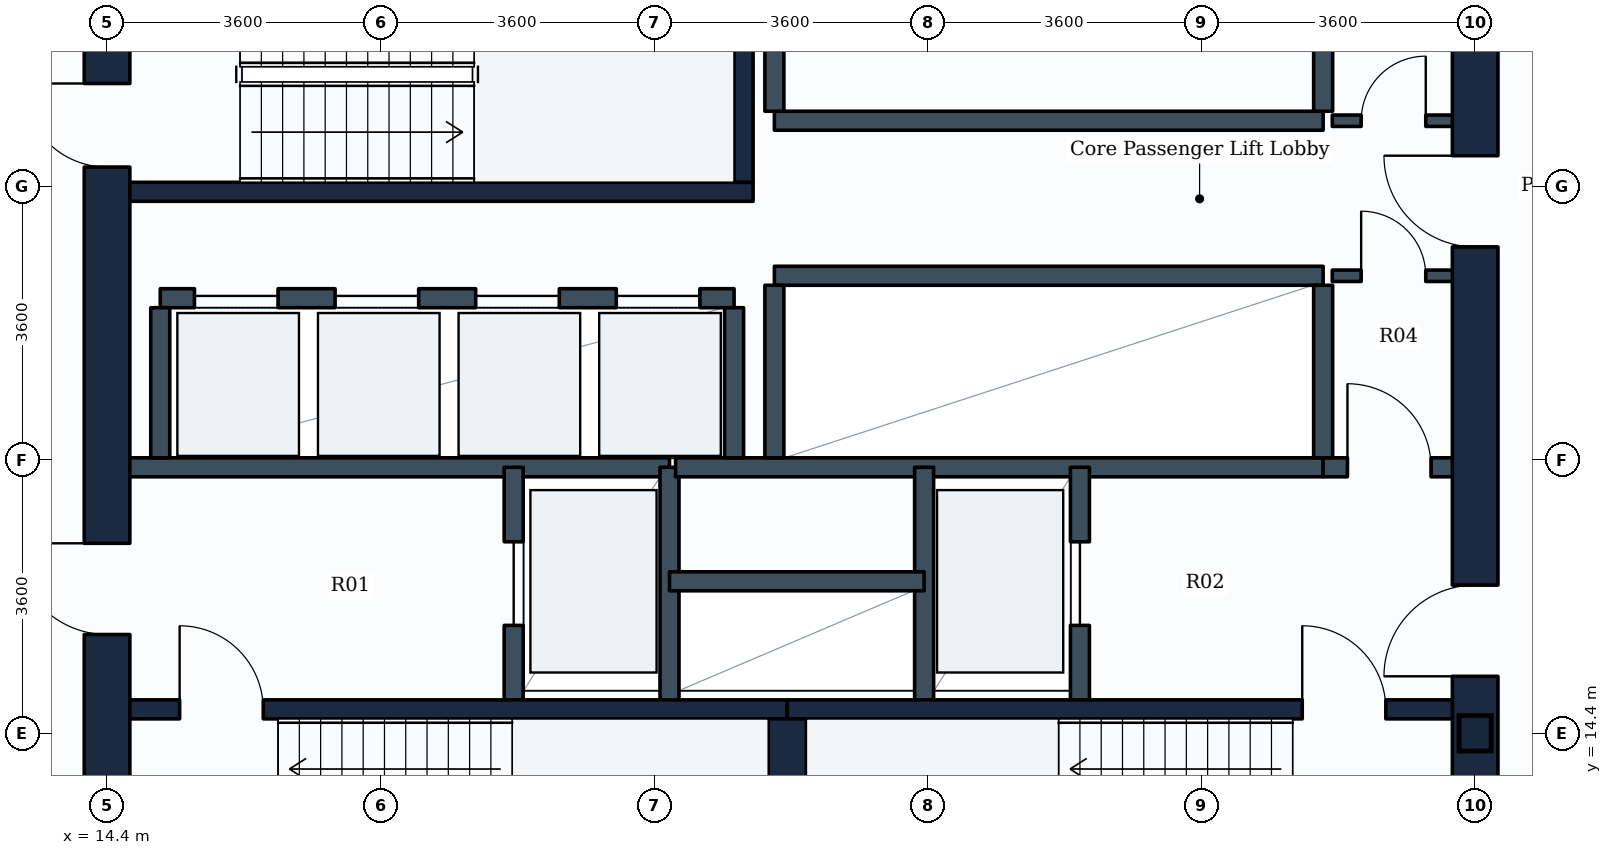
"""IFC4 building model, lengths in metres.
Left out: names, types, materials, properties, quantities, classifications, styles, units other than length and angle.
Written with IfcOpenShell. Run it as: python <this file> out.ifc"""

import sys

from ifc_helpers import new_model, si_unit, direction, frame, frame_2d, origin, origin_2d, place, context, subcontext, project, spatial, rectangle, i_section, extrude, element, fill, save


model = new_model("IFC4")
c1 = context("Model", 3, precision=1e-05, world=origin(), true_north=direction((0.0, 1.0)))
c2 = subcontext(c1, "Body", "Model", "MODEL_VIEW")
j1 = project(units=[si_unit("LENGTHUNIT", "METRE"), si_unit("PLANEANGLEUNIT", "RADIAN")], contexts=[c1])
p1 = place(None, origin())
s1 = spatial("IfcSite", under=j1, at=p1, CompositionType="ELEMENT")
p2 = place(p1, origin())
s2 = spatial("IfcBuilding", under=s1, at=p2, CompositionType="ELEMENT")
p3 = place(p2, frame((0.0, 0.0, 43.5)))
s3 = spatial("IfcBuildingStorey", under=s2, at=p3, CompositionType="ELEMENT", Elevation=43.5)
p4 = place(p3, frame((32.4, 14.4, 0.0), z_axis=(0.0, 0.0, 1.0), x_axis=(1.0, 0.0, 0.0)))
e1 = element("IfcColumn", 1, at=p4, inside=s3, PredefinedType="COLUMN", context=c2, shape_type="SweptSolid", body=[
    extrude(i_section(OverallWidth=0.424, OverallDepth=0.467, WebThickness=0.033, FlangeThickness=0.053, FilletRadius=0.015, at=origin_2d()), origin(), (0.0, 0.0, 1.0), 3.9),
])
p5 = place(p3, frame((14.4, 10.8, 0.0), z_axis=(0.0, 0.0, 1.0), x_axis=(0.0, 1.0, 0.0)))
e2 = element("IfcWall", 2, at=p5, inside=s3, PredefinedType="SHEAR", context=c2, shape_type="SweptSolid", body=[
    extrude(rectangle(XDim=14.4, YDim=0.6, at=frame_2d((7.2, 0.0))), origin(), (0.0, 0.0, 1.0), 3.65),
])
p6 = place(p5, frame((11.05, 0.0, 0.0)))
e3 = element("IfcOpeningElement", 3, at=p6, cuts=e2, PredefinedType="OPENING", context=c2, shape_type="SweptSolid", body=[
    extrude(rectangle(XDim=1.1, YDim=2.1, at=frame_2d((0.55, 1.05))), frame((0.0, 0.31, 0.0), z_axis=(0.0, -1.0, 0.0), x_axis=(1.0, 0.0, 0.0)), (0.0, 0.0, 1.0), 0.62),
])
p7 = place(p5, frame((4.9, 0.0, 0.0)))
e4 = element("IfcOpeningElement", 4, at=p7, cuts=e2, PredefinedType="OPENING", context=c2, shape_type="SweptSolid", body=[
    extrude(rectangle(XDim=1.2, YDim=2.1, at=frame_2d((0.6, 1.05))), frame((0.0, 0.31, 0.0), z_axis=(0.0, -1.0, 0.0), x_axis=(1.0, 0.0, 0.0)), (0.0, 0.0, 1.0), 0.62),
])
p8 = place(p3, frame((32.4, 10.8, 0.0), z_axis=(0.0, 0.0, 1.0), x_axis=(0.0, 1.0, 0.0)))
e5 = element("IfcWall", 5, at=p8, inside=s3, PredefinedType="SHEAR", context=c2, shape_type="SweptSolid", body=[
    extrude(rectangle(XDim=14.4, YDim=0.6, at=frame_2d((7.2, 0.0))), origin(), (0.0, 0.0, 1.0), 3.65),
])
p9 = place(p8, frame((4.35, 0.0, 0.0)))
e6 = element("IfcOpeningElement", 6, at=p9, cuts=e5, PredefinedType="OPENING", context=c2, shape_type="SweptSolid", body=[
    extrude(rectangle(XDim=1.2, YDim=2.1, at=frame_2d((0.6, 1.05))), frame((0.0, 0.31, 0.0), z_axis=(0.0, -1.0, 0.0), x_axis=(1.0, 0.0, 0.0)), (0.0, 0.0, 1.0), 0.62),
])
p10 = place(p8, frame((10.0, 0.0, 0.0)))
e7 = element("IfcOpeningElement", 7, at=p10, cuts=e5, PredefinedType="OPENING", context=c2, shape_type="SweptSolid", body=[
    extrude(rectangle(XDim=1.2, YDim=2.1, at=frame_2d((0.6, 1.05))), frame((0.0, 0.31, 0.0), z_axis=(0.0, -1.0, 0.0), x_axis=(1.0, 0.0, 0.0)), (0.0, 0.0, 1.0), 0.62),
])
p11 = place(p3, frame((14.7, 14.715, 0.0), z_axis=(0.0, 0.0, 1.0), x_axis=(1.0, 0.0, 0.0)))
e8 = element("IfcWall", 8, at=p11, inside=s3, PredefinedType="SHEAR", context=c2, shape_type="SweptSolid", body=[
    extrude(rectangle(XDim=8.65, YDim=0.25, at=frame_2d((4.325, 0.0))), origin(), (0.0, 0.0, 1.0), 3.65),
])
p12 = place(p11, frame((0.655, 0.0, 0.0)))
e9 = element("IfcOpeningElement", 9, at=p12, cuts=e8, PredefinedType="OPENING", context=c2, shape_type="SweptSolid", body=[
    extrude(rectangle(XDim=1.1, YDim=2.1, at=frame_2d((0.55, 1.05))), frame((0.0, 0.135, 0.0), z_axis=(0.0, -1.0, 0.0), x_axis=(1.0, 0.0, 0.0)), (0.0, 0.0, 1.0), 0.27),
])
p13 = place(p3, frame((23.35, 14.715, 0.0), z_axis=(0.0, 0.0, 1.0), x_axis=(1.0, 0.0, 0.0)))
e10 = element("IfcWall", 10, at=p13, inside=s3, PredefinedType="SHEAR", context=c2, shape_type="SweptSolid", body=[
    extrude(rectangle(XDim=8.75, YDim=0.25, at=frame_2d((4.375, 0.0))), origin(), (0.0, 0.0, 1.0), 3.65),
])
p14 = place(p13, frame((6.775, 0.0, 0.0)))
e11 = element("IfcOpeningElement", 11, at=p14, cuts=e10, PredefinedType="OPENING", context=c2, shape_type="SweptSolid", body=[
    extrude(rectangle(XDim=1.1, YDim=2.1, at=frame_2d((0.55, 1.05))), frame((0.0, 0.135, 0.0), z_axis=(0.0, -1.0, 0.0), x_axis=(1.0, 0.0, 0.0)), (0.0, 0.0, 1.0), 0.27),
])
p15 = place(p3, frame((23.35, 11.75, 0.0), z_axis=(0.0, 0.0, 1.0), x_axis=(0.0, 1.0, 0.0)))
e12 = element("IfcWall", 12, at=p15, inside=s3, PredefinedType="SHEAR", context=c2, shape_type="SweptSolid", body=[
    extrude(rectangle(XDim=2.84, YDim=0.5, at=frame_2d((1.42, 0.0))), origin(), (0.0, 0.0, 1.0), 3.65),
])
p16 = place(p3, frame((14.7, 21.525, 0.0), z_axis=(0.0, 0.0, 1.0), x_axis=(1.0, 0.0, 0.0)))
e13 = element("IfcWall", 13, at=p16, inside=s3, PredefinedType="SHEAR", context=c2, shape_type="SweptSolid", body=[
    extrude(rectangle(XDim=8.2, YDim=0.25, at=frame_2d((4.1, 0.0))), origin(), (0.0, 0.0, 1.0), 3.65),
])
p17 = place(p3, frame((22.775, 21.65, 0.0), z_axis=(0.0, 0.0, 1.0), x_axis=(0.0, 1.0, 0.0)))
e14 = element("IfcWall", 14, at=p17, inside=s3, PredefinedType="SHEAR", context=c2, shape_type="SweptSolid", body=[
    extrude(rectangle(XDim=2.84, YDim=0.25, at=frame_2d((1.42, 0.0))), origin(), (0.0, 0.0, 1.0), 3.65),
])
p18 = place(p3, frame((14.65, 17.9, 0.0), z_axis=(0.0, 0.0, 1.0), x_axis=(1.0, 0.0, 0.0)))
e15 = element("IfcWall", 15, at=p18, inside=s3, PredefinedType="PARTITIONING", context=c2, shape_type="SweptSolid", body=[
    extrude(rectangle(XDim=7.15, YDim=0.25, at=frame_2d((3.575, 0.0))), origin(), (0.0, 0.0, 1.0), 3.635),
])
p19 = place(p3, frame((19.75, 14.84, 0.0), z_axis=(0.0, 0.0, 1.0), x_axis=(0.0, 1.0, 0.0)))
e16 = element("IfcWall", 16, at=p19, inside=s3, PredefinedType="PARTITIONING", context=c2, shape_type="SweptSolid", body=[
    extrude(rectangle(XDim=3.06, YDim=0.25, at=frame_2d((1.53, 0.0))), origin(), (0.0, 0.0, 1.0), 3.635),
])
p20 = place(p19, frame((0.98, 0.0, 0.0)))
e17 = element("IfcOpeningElement", 17, at=p20, cuts=e16, PredefinedType="OPENING", context=c2, shape_type="SweptSolid", body=[
    extrude(rectangle(XDim=1.1, YDim=2.1, at=frame_2d((0.55, 1.05))), frame((0.0, 0.135, 0.0), z_axis=(0.0, -1.0, 0.0), x_axis=(1.0, 0.0, 0.0)), (0.0, 0.0, 1.0), 0.27),
])
p21 = place(p3, frame((21.8, 14.84, 0.0), z_axis=(0.0, 0.0, 1.0), x_axis=(0.0, 1.0, 0.0)))
e18 = element("IfcWall", 18, at=p21, inside=s3, PredefinedType="PARTITIONING", context=c2, shape_type="SweptSolid", body=[
    extrude(rectangle(XDim=3.06, YDim=0.25, at=frame_2d((1.53, 0.0))), origin(), (0.0, 0.0, 1.0), 3.635),
])
p22 = place(p3, frame((21.88, 17.9, 0.0), z_axis=(0.0, 0.0, 1.0), x_axis=(1.0, 0.0, 0.0)))
e19 = element("IfcWall", 19, at=p22, inside=s3, PredefinedType="PARTITIONING", context=c2, shape_type="SweptSolid", body=[
    extrude(rectangle(XDim=8.52, YDim=0.25, at=frame_2d((4.26, 0.0))), origin(), (0.0, 0.0, 1.0), 3.635),
])
p23 = place(p3, frame((30.4, 17.9, 0.0), z_axis=(0.0, 0.0, 1.0), x_axis=(1.0, 0.0, 0.0)))
e20 = element("IfcWall", 20, at=p23, inside=s3, PredefinedType="PARTITIONING", context=c2, shape_type="SweptSolid", body=[
    extrude(rectangle(XDim=1.75, YDim=0.25, at=frame_2d((0.875, 0.0))), origin(), (0.0, 0.0, 1.0), 3.635),
])
p24 = place(p23, frame((0.32, 0.0, 0.0)))
e21 = element("IfcOpeningElement", 21, at=p24, cuts=e20, PredefinedType="OPENING", context=c2, shape_type="SweptSolid", body=[
    extrude(rectangle(XDim=1.1, YDim=2.1, at=frame_2d((0.55, 1.05))), frame((0.0, 0.135, 0.0), z_axis=(0.0, -1.0, 0.0), x_axis=(1.0, 0.0, 0.0)), (0.0, 0.0, 1.0), 0.27),
])
p25 = place(p3, frame((25.15, 14.84, 0.0), z_axis=(0.0, 0.0, 1.0), x_axis=(0.0, 1.0, 0.0)))
e22 = element("IfcWall", 22, at=p25, inside=s3, PredefinedType="PARTITIONING", context=c2, shape_type="SweptSolid", body=[
    extrude(rectangle(XDim=3.06, YDim=0.25, at=frame_2d((1.53, 0.0))), origin(), (0.0, 0.0, 1.0), 3.635),
])
p26 = place(p3, frame((27.2, 14.84, 0.0), z_axis=(0.0, 0.0, 1.0), x_axis=(0.0, 1.0, 0.0)))
e23 = element("IfcWall", 23, at=p26, inside=s3, PredefinedType="PARTITIONING", context=c2, shape_type="SweptSolid", body=[
    extrude(rectangle(XDim=3.06, YDim=0.25, at=frame_2d((1.53, 0.0))), origin(), (0.0, 0.0, 1.0), 3.635),
])
p27 = place(p26, frame((0.98, 0.0, 0.0)))
e24 = element("IfcOpeningElement", 24, at=p27, cuts=e23, PredefinedType="OPENING", context=c2, shape_type="SweptSolid", body=[
    extrude(rectangle(XDim=1.1, YDim=2.1, at=frame_2d((0.55, 1.05))), frame((0.0, 0.135, 0.0), z_axis=(0.0, -1.0, 0.0), x_axis=(1.0, 0.0, 0.0)), (0.0, 0.0, 1.0), 0.27),
])
p28 = place(p3, frame((21.8, 16.4, 0.0), z_axis=(0.0, 0.0, 1.0), x_axis=(1.0, 0.0, 0.0)))
e25 = element("IfcWall", 25, at=p28, inside=s3, PredefinedType="PARTITIONING", context=c2, shape_type="SweptSolid", body=[
    extrude(rectangle(XDim=3.35, YDim=0.25, at=frame_2d((1.675, 0.0))), origin(), (0.0, 0.0, 1.0), 3.635),
])
p29 = place(p3, frame((15.1, 20.125, 0.0), z_axis=(0.0, 0.0, 1.0), x_axis=(1.0, 0.0, 0.0)))
e26 = element("IfcWall", 26, at=p29, inside=s3, PredefinedType="PARTITIONING", context=c2, shape_type="SweptSolid", body=[
    extrude(rectangle(XDim=7.55, YDim=0.25, at=frame_2d((3.775, 0.0))), origin(), (0.0, 0.0, 1.0), 3.635),
])
p30 = place(p29, frame((0.45, 0.0, 0.0)))
e27 = element("IfcOpeningElement", 27, at=p30, cuts=e26, PredefinedType="OPENING", context=c2, shape_type="SweptSolid", body=[
    extrude(rectangle(XDim=1.1, YDim=2.1, at=frame_2d((0.55, 1.05))), frame((0.0, 0.135, 0.0), z_axis=(0.0, -1.0, 0.0), x_axis=(1.0, 0.0, 0.0)), (0.0, 0.0, 1.0), 0.27),
])
p31 = place(p29, frame((2.3, 0.0, 0.0)))
e28 = element("IfcOpeningElement", 28, at=p31, cuts=e26, PredefinedType="OPENING", context=c2, shape_type="SweptSolid", body=[
    extrude(rectangle(XDim=1.1, YDim=2.1, at=frame_2d((0.55, 1.05))), frame((0.0, 0.135, 0.0), z_axis=(0.0, -1.0, 0.0), x_axis=(1.0, 0.0, 0.0)), (0.0, 0.0, 1.0), 0.27),
])
p32 = place(p29, frame((4.15, 0.0, 0.0)))
e29 = element("IfcOpeningElement", 29, at=p32, cuts=e26, PredefinedType="OPENING", context=c2, shape_type="SweptSolid", body=[
    extrude(rectangle(XDim=1.1, YDim=2.1, at=frame_2d((0.55, 1.05))), frame((0.0, 0.135, 0.0), z_axis=(0.0, -1.0, 0.0), x_axis=(1.0, 0.0, 0.0)), (0.0, 0.0, 1.0), 0.27),
])
p33 = place(p29, frame((6.0, 0.0, 0.0)))
e30 = element("IfcOpeningElement", 30, at=p33, cuts=e26, PredefinedType="OPENING", context=c2, shape_type="SweptSolid", body=[
    extrude(rectangle(XDim=1.1, YDim=2.1, at=frame_2d((0.55, 1.05))), frame((0.0, 0.135, 0.0), z_axis=(0.0, -1.0, 0.0), x_axis=(1.0, 0.0, 0.0)), (0.0, 0.0, 1.0), 0.27),
])
for number, where, z_axis, x_axis in (
    (31, (15.1, 18.025, 0.0), (0.0, 0.0, 1.0), (0.0, 1.0, 0.0)),
    (32, (22.65, 18.025, 0.0), (0.0, 0.0, 1.0), (0.0, 1.0, 0.0)),
):
    element("IfcWall", number, at=place(p3, frame(where, z_axis=z_axis, x_axis=x_axis)), inside=s3, PredefinedType="PARTITIONING", context=c2, shape_type="SweptSolid", body=[
        extrude(rectangle(XDim=1.975, YDim=0.25, at=frame_2d((0.988, 0.0))), origin(), (0.0, 0.0, 1.0), 3.635),
    ])
p34 = place(p3, frame((23.18, 20.42, 0.0), z_axis=(0.0, 0.0, 1.0), x_axis=(1.0, 0.0, 0.0)))
e33 = element("IfcWall", 33, at=p34, inside=s3, PredefinedType="PARTITIONING", context=c2, shape_type="SweptSolid", body=[
    extrude(rectangle(XDim=7.22, YDim=0.25, at=frame_2d((3.61, 0.0))), origin(), (0.0, 0.0, 1.0), 3.635),
])
for number, where, z_axis, x_axis in (
    (34, (23.18, 18.025, 0.0), (0.0, 0.0, 1.0), (0.0, 1.0, 0.0)),
    (35, (30.4, 18.025, 0.0), (0.0, 0.0, 1.0), (0.0, 1.0, 0.0)),
):
    element("IfcWall", number, at=place(p3, frame(where, z_axis=z_axis, x_axis=x_axis)), inside=s3, PredefinedType="PARTITIONING", context=c2, shape_type="SweptSolid", body=[
        extrude(rectangle(XDim=2.27, YDim=0.25, at=frame_2d((1.135, 0.0))), origin(), (0.0, 0.0, 1.0), 3.635),
    ])
p35 = place(p3, frame((23.18, 22.46, 0.0), z_axis=(0.0, 0.0, 1.0), x_axis=(1.0, 0.0, 0.0)))
e36 = element("IfcWall", 36, at=p35, inside=s3, PredefinedType="PARTITIONING", context=c2, shape_type="SweptSolid", body=[
    extrude(rectangle(XDim=7.22, YDim=0.25, at=frame_2d((3.61, 0.0))), origin(), (0.0, 0.0, 1.0), 3.635),
])
for number, where, z_axis, x_axis in (
    (37, (23.18, 22.585, 0.0), (0.0, 0.0, 1.0), (0.0, 1.0, 0.0)),
    (38, (30.4, 22.585, 0.0), (0.0, 0.0, 1.0), (0.0, 1.0, 0.0)),
):
    element("IfcWall", number, at=place(p3, frame(where, z_axis=z_axis, x_axis=x_axis)), inside=s3, PredefinedType="PARTITIONING", context=c2, shape_type="SweptSolid", body=[
        extrude(rectangle(XDim=2.315, YDim=0.25, at=frame_2d((1.157, 0.0))), origin(), (0.0, 0.0, 1.0), 3.635),
    ])
p36 = place(p3, frame((30.52, 22.46, 0.0), z_axis=(0.0, 0.0, 1.0), x_axis=(1.0, 0.0, 0.0)))
e39 = element("IfcWall", 39, at=p36, inside=s3, PredefinedType="PARTITIONING", context=c2, shape_type="SweptSolid", body=[
    extrude(rectangle(XDim=1.63, YDim=0.15, at=frame_2d((0.815, 0.0))), origin(), (0.0, 0.0, 1.0), 3.635),
])
p37 = place(p36, frame((0.38, 0.0, 0.0)))
e40 = element("IfcOpeningElement", 40, at=p37, cuts=e39, PredefinedType="OPENING", context=c2, shape_type="SweptSolid", body=[
    extrude(rectangle(XDim=0.85, YDim=2.1, at=frame_2d((0.425, 1.05))), frame((0.0, 0.085, 0.0), z_axis=(0.0, -1.0, 0.0), x_axis=(1.0, 0.0, 0.0)), (0.0, 0.0, 1.0), 0.17),
])
p38 = place(p3, frame((30.52, 20.42, 0.0), z_axis=(0.0, 0.0, 1.0), x_axis=(1.0, 0.0, 0.0)))
e41 = element("IfcWall", 41, at=p38, inside=s3, PredefinedType="PARTITIONING", context=c2, shape_type="SweptSolid", body=[
    extrude(rectangle(XDim=1.63, YDim=0.15, at=frame_2d((0.815, 0.0))), origin(), (0.0, 0.0, 1.0), 3.635),
])
p39 = place(p38, frame((0.38, 0.0, 0.0)))
e42 = element("IfcOpeningElement", 42, at=p39, cuts=e41, PredefinedType="OPENING", context=c2, shape_type="SweptSolid", body=[
    extrude(rectangle(XDim=0.85, YDim=2.1, at=frame_2d((0.425, 1.05))), frame((0.0, 0.085, 0.0), z_axis=(0.0, -1.0, 0.0), x_axis=(1.0, 0.0, 0.0)), (0.0, 0.0, 1.0), 0.17),
])
p40 = place(p12, origin())
e43 = element("IfcDoor", 43, at=p40, inside=s3, OperationType="SINGLE_SWING_LEFT", PredefinedType="DOOR", context=c2, shape_type="SweptSolid", body=[
    extrude(rectangle(XDim=1.1, YDim=2.1, at=frame_2d((0.55, 1.05))), frame((0.0, 0.025, 0.0), z_axis=(0.0, -1.0, 0.0), x_axis=(1.0, 0.0, 0.0)), (0.0, 0.0, 1.0), 0.05),
])
fill(e9, e43)
p41 = place(p14, origin())
e44 = element("IfcDoor", 44, at=p41, inside=s3, OperationType="SINGLE_SWING_LEFT", PredefinedType="DOOR", context=c2, shape_type="SweptSolid", body=[
    extrude(rectangle(XDim=1.1, YDim=2.1, at=frame_2d((0.55, 1.05))), frame((0.0, 0.025, 0.0), z_axis=(0.0, -1.0, 0.0), x_axis=(1.0, 0.0, 0.0)), (0.0, 0.0, 1.0), 0.05),
])
fill(e11, e44)
p42 = place(p6, origin())
e45 = element("IfcDoor", 45, at=p42, inside=s3, OperationType="SINGLE_SWING_RIGHT", PredefinedType="DOOR", context=c2, shape_type="SweptSolid", body=[
    extrude(rectangle(XDim=1.1, YDim=2.1, at=frame_2d((0.55, 1.05))), frame((0.0, 0.025, 0.0), z_axis=(0.0, -1.0, 0.0), x_axis=(1.0, 0.0, 0.0)), (0.0, 0.0, 1.0), 0.05),
])
fill(e3, e45)
p43 = place(p20, origin())
e46 = element("IfcDoor", 46, at=p43, inside=s3, OperationType="SLIDING_TO_LEFT", PredefinedType="DOOR", context=c2, shape_type="SweptSolid", body=[
    extrude(rectangle(XDim=1.1, YDim=2.1, at=frame_2d((0.55, 1.05))), frame((0.0, 0.025, 0.0), z_axis=(0.0, -1.0, 0.0), x_axis=(1.0, 0.0, 0.0)), (0.0, 0.0, 1.0), 0.05),
])
fill(e17, e46)
p44 = place(p27, origin())
e47 = element("IfcDoor", 47, at=p44, inside=s3, OperationType="SLIDING_TO_LEFT", PredefinedType="DOOR", context=c2, shape_type="SweptSolid", body=[
    extrude(rectangle(XDim=1.1, YDim=2.1, at=frame_2d((0.55, 1.05))), frame((0.0, 0.025, 0.0), z_axis=(0.0, -1.0, 0.0), x_axis=(1.0, 0.0, 0.0)), (0.0, 0.0, 1.0), 0.05),
])
fill(e24, e47)
p45 = place(p7, origin())
e48 = element("IfcDoor", 48, at=p45, inside=s3, OperationType="SINGLE_SWING_RIGHT", PredefinedType="DOOR", context=c2, shape_type="SweptSolid", body=[
    extrude(rectangle(XDim=1.2, YDim=2.1, at=frame_2d((0.6, 1.05))), frame((0.0, 0.025, 0.0), z_axis=(0.0, -1.0, 0.0), x_axis=(1.0, 0.0, 0.0)), (0.0, 0.0, 1.0), 0.05),
])
fill(e4, e48)
p46 = place(p9, origin())
e49 = element("IfcDoor", 49, at=p46, inside=s3, OperationType="SINGLE_SWING_LEFT", PredefinedType="DOOR", context=c2, shape_type="SweptSolid", body=[
    extrude(rectangle(XDim=1.2, YDim=2.1, at=frame_2d((0.6, 1.05))), frame((0.0, 0.025, 0.0), z_axis=(0.0, -1.0, 0.0), x_axis=(1.0, 0.0, 0.0)), (0.0, 0.0, 1.0), 0.05),
])
fill(e6, e49)
p47 = place(p24, origin())
e50 = element("IfcDoor", 50, at=p47, inside=s3, OperationType="SINGLE_SWING_LEFT", PredefinedType="DOOR", context=c2, shape_type="SweptSolid", body=[
    extrude(rectangle(XDim=1.1, YDim=2.1, at=frame_2d((0.55, 1.05))), frame((0.0, 0.025, 0.0), z_axis=(0.0, -1.0, 0.0), x_axis=(1.0, 0.0, 0.0)), (0.0, 0.0, 1.0), 0.05),
])
fill(e21, e50)
p48 = place(p30, origin())
e51 = element("IfcDoor", 51, at=p48, inside=s3, OperationType="SLIDING_TO_LEFT", PredefinedType="DOOR", context=c2, shape_type="SweptSolid", body=[
    extrude(rectangle(XDim=1.1, YDim=2.1, at=frame_2d((0.55, 1.05))), frame((0.0, 0.025, 0.0), z_axis=(0.0, -1.0, 0.0), x_axis=(1.0, 0.0, 0.0)), (0.0, 0.0, 1.0), 0.05),
])
fill(e27, e51)
p49 = place(p31, origin())
e52 = element("IfcDoor", 52, at=p49, inside=s3, OperationType="SLIDING_TO_LEFT", PredefinedType="DOOR", context=c2, shape_type="SweptSolid", body=[
    extrude(rectangle(XDim=1.1, YDim=2.1, at=frame_2d((0.55, 1.05))), frame((0.0, 0.025, 0.0), z_axis=(0.0, -1.0, 0.0), x_axis=(1.0, 0.0, 0.0)), (0.0, 0.0, 1.0), 0.05),
])
fill(e28, e52)
p50 = place(p32, origin())
e53 = element("IfcDoor", 53, at=p50, inside=s3, OperationType="SLIDING_TO_LEFT", PredefinedType="DOOR", context=c2, shape_type="SweptSolid", body=[
    extrude(rectangle(XDim=1.1, YDim=2.1, at=frame_2d((0.55, 1.05))), frame((0.0, 0.025, 0.0), z_axis=(0.0, -1.0, 0.0), x_axis=(1.0, 0.0, 0.0)), (0.0, 0.0, 1.0), 0.05),
])
fill(e29, e53)
p51 = place(p33, origin())
e54 = element("IfcDoor", 54, at=p51, inside=s3, OperationType="SLIDING_TO_LEFT", PredefinedType="DOOR", context=c2, shape_type="SweptSolid", body=[
    extrude(rectangle(XDim=1.1, YDim=2.1, at=frame_2d((0.55, 1.05))), frame((0.0, 0.025, 0.0), z_axis=(0.0, -1.0, 0.0), x_axis=(1.0, 0.0, 0.0)), (0.0, 0.0, 1.0), 0.05),
])
fill(e30, e54)
p52 = place(p10, origin())
e55 = element("IfcDoor", 55, at=p52, inside=s3, OperationType="SINGLE_SWING_RIGHT", PredefinedType="DOOR", context=c2, shape_type="SweptSolid", body=[
    extrude(rectangle(XDim=1.2, YDim=2.1, at=frame_2d((0.6, 1.05))), frame((0.0, 0.025, 0.0), z_axis=(0.0, -1.0, 0.0), x_axis=(1.0, 0.0, 0.0)), (0.0, 0.0, 1.0), 0.05),
])
fill(e7, e55)
p53 = place(p37, origin())
e56 = element("IfcDoor", 56, at=p53, inside=s3, OperationType="SINGLE_SWING_RIGHT", PredefinedType="DOOR", context=c2, shape_type="SweptSolid", body=[
    extrude(rectangle(XDim=0.85, YDim=2.1, at=frame_2d((0.425, 1.05))), frame((0.0, 0.025, 0.0), z_axis=(0.0, -1.0, 0.0), x_axis=(1.0, 0.0, 0.0)), (0.0, 0.0, 1.0), 0.05),
])
fill(e40, e56)
p54 = place(p39, origin())
e57 = element("IfcDoor", 57, at=p54, inside=s3, OperationType="SINGLE_SWING_LEFT", PredefinedType="DOOR", context=c2, shape_type="SweptSolid", body=[
    extrude(rectangle(XDim=0.85, YDim=2.1, at=frame_2d((0.425, 1.05))), frame((0.0, 0.025, 0.0), z_axis=(0.0, -1.0, 0.0), x_axis=(1.0, 0.0, 0.0)), (0.0, 0.0, 1.0), 0.05),
])
fill(e42, e57)
save(model, sys.argv[1])
